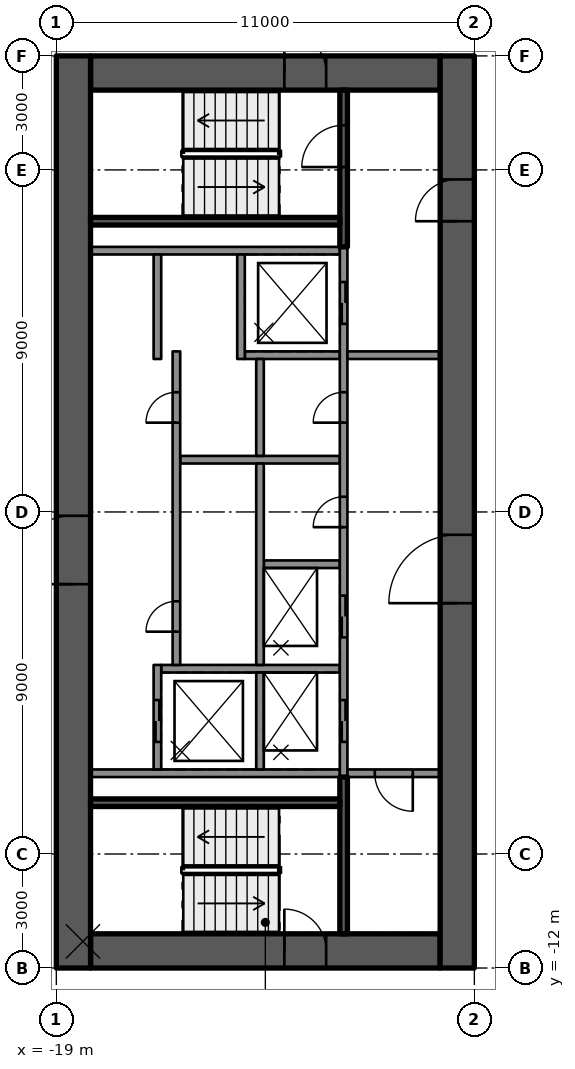
"""IFC4 building model, lengths in metres.
Left out: names, types, materials, properties, quantities, classifications, styles, units other than length and angle.
Written with IfcOpenShell. Run it as: python <this file> out.ifc"""

import sys

from ifc_helpers import new_model, si_unit, direction, frame, frame_2d, origin, place, context, subcontext, project, spatial, rectangle, extrude, element, fill, save


model = new_model("IFC4")
c1 = context("Model", 3, precision=1e-05, world=origin(), true_north=direction((0.0, 1.0)))
c2 = subcontext(c1, "Body", "Model", "MODEL_VIEW")
j1 = project(units=[si_unit("LENGTHUNIT", "METRE"), si_unit("PLANEANGLEUNIT", "RADIAN")], contexts=[c1])
p1 = place(None, origin())
s1 = spatial("IfcSite", under=j1, at=p1, CompositionType="ELEMENT")
p2 = place(p1, origin())
s2 = spatial("IfcBuilding", under=s1, at=p2, CompositionType="ELEMENT")
p3 = place(p2, frame((0.0, 0.0, 235.5)))
s3 = spatial("IfcBuildingStorey", under=s2, at=p3, CompositionType="ELEMENT", Elevation=235.5)
p4 = place(p3, frame((-18.1, 11.55, 0.0), z_axis=(0.0, 0.0, 1.0), x_axis=(1.0, 0.0, 0.0)))
e1 = element("IfcWall", 1, at=p4, inside=s3, PredefinedType="SHEAR", context=c2, shape_type="SweptSolid", body=[
    extrude(rectangle(XDim=9.2, YDim=0.9, at=frame_2d((4.6, 0.0))), origin(), (0.0, 0.0, 1.0), 3.5),
])
p5 = place(p4, frame((5.1, 0.0, 0.0)))
e2 = element("IfcOpeningElement", 2, at=p5, cuts=e1, PredefinedType="OPENING", context=c2, shape_type="SweptSolid", body=[
    extrude(rectangle(XDim=1.1, YDim=2.1, at=frame_2d((0.55, 1.05))), frame((0.0, 0.46, 0.0), z_axis=(0.0, -1.0, 0.0), x_axis=(1.0, 0.0, 0.0)), (0.0, 0.0, 1.0), 0.92),
])
p6 = place(p3, frame((-18.1, -11.55, 0.0), z_axis=(0.0, 0.0, 1.0), x_axis=(1.0, 0.0, 0.0)))
e3 = element("IfcWall", 3, at=p6, inside=s3, PredefinedType="SHEAR", context=c2, shape_type="SweptSolid", body=[
    extrude(rectangle(XDim=9.2, YDim=0.9, at=frame_2d((4.6, 0.0))), origin(), (0.0, 0.0, 1.0), 3.5),
])
p7 = place(p6, frame((5.1, 0.0, 0.0)))
e4 = element("IfcOpeningElement", 4, at=p7, cuts=e3, PredefinedType="OPENING", context=c2, shape_type="SweptSolid", body=[
    extrude(rectangle(XDim=1.1, YDim=2.1, at=frame_2d((0.55, 1.05))), frame((0.0, 0.46, 0.0), z_axis=(0.0, -1.0, 0.0), x_axis=(1.0, 0.0, 0.0)), (0.0, 0.0, 1.0), 0.92),
])
p8 = place(p3, frame((-18.55, -12.0, 0.0), z_axis=(0.0, 0.0, 1.0), x_axis=(0.0, 1.0, 0.0)))
e5 = element("IfcWall", 5, at=p8, inside=s3, PredefinedType="SHEAR", context=c2, shape_type="SweptSolid", body=[
    extrude(rectangle(XDim=24.0, YDim=0.9, at=frame_2d((12.0, 0.0))), origin(), (0.0, 0.0, 1.0), 3.5),
])
p9 = place(p8, frame((10.1, 0.0, 0.0)))
e6 = element("IfcOpeningElement", 6, at=p9, cuts=e5, PredefinedType="OPENING", context=c2, shape_type="SweptSolid", body=[
    extrude(rectangle(XDim=1.8, YDim=2.1, at=frame_2d((0.9, 1.05))), frame((0.0, 0.46, 0.0), z_axis=(0.0, -1.0, 0.0), x_axis=(1.0, 0.0, 0.0)), (0.0, 0.0, 1.0), 0.92),
])
p10 = place(p3, frame((-8.45, -12.0, 0.0), z_axis=(0.0, 0.0, 1.0), x_axis=(0.0, 1.0, 0.0)))
e7 = element("IfcWall", 7, at=p10, inside=s3, PredefinedType="SHEAR", context=c2, shape_type="SweptSolid", body=[
    extrude(rectangle(XDim=24.0, YDim=0.9, at=frame_2d((12.0, 0.0))), origin(), (0.0, 0.0, 1.0), 3.5),
])
p11 = place(p10, frame((9.6, 0.0, 0.0)))
e8 = element("IfcOpeningElement", 8, at=p11, cuts=e7, PredefinedType="OPENING", context=c2, shape_type="SweptSolid", body=[
    extrude(rectangle(XDim=1.8, YDim=2.1, at=frame_2d((0.9, 1.05))), frame((0.0, 0.46, 0.0), z_axis=(0.0, -1.0, 0.0), x_axis=(1.0, 0.0, 0.0)), (0.0, 0.0, 1.0), 0.92),
])
p12 = place(p10, frame((19.65, 0.0, 0.0)))
e9 = element("IfcOpeningElement", 9, at=p12, cuts=e7, PredefinedType="OPENING", context=c2, shape_type="SweptSolid", body=[
    extrude(rectangle(XDim=1.1, YDim=2.1, at=frame_2d((0.55, 1.05))), frame((0.0, 0.46, 0.0), z_axis=(0.0, -1.0, 0.0), x_axis=(1.0, 0.0, 0.0)), (0.0, 0.0, 1.0), 0.92),
])
for number, where, z_axis, x_axis in (
    (10, (-11.54, 6.875, 0.0), (0.0, 0.0, 1.0), (-1.0, 0.0, 0.0)),
    (11, (-11.54, -6.875, 0.0), (0.0, 0.0, 1.0), (-1.0, 0.0, 0.0)),
):
    element("IfcWall", number, at=place(p3, frame(where, z_axis=z_axis, x_axis=x_axis)), inside=s3, PredefinedType="SOLIDWALL", context=c2, shape_type="SweptSolid", body=[
        extrude(rectangle(XDim=6.56, YDim=0.2, at=frame_2d((3.28, 0.0))), origin(), (0.0, 0.0, 1.0), 3.09),
    ])
p13 = place(p3, frame((-11.54, -4.125, 0.0), z_axis=(0.0, 0.0, 1.0), x_axis=(-1.0, 0.0, 0.0)))
e12 = element("IfcWall", 12, at=p13, inside=s3, PredefinedType="SOLIDWALL", context=c2, shape_type="SweptSolid", body=[
    extrude(rectangle(XDim=4.7, YDim=0.2, at=frame_2d((2.35, 0.0))), origin(), (0.0, 0.0, 1.0), 3.09),
])
p14 = place(p3, frame((-11.54, -1.375, 0.0), z_axis=(0.0, 0.0, 1.0), x_axis=(-1.0, 0.0, 0.0)))
e13 = element("IfcWall", 13, at=p14, inside=s3, PredefinedType="SOLIDWALL", context=c2, shape_type="SweptSolid", body=[
    extrude(rectangle(XDim=2.0, YDim=0.2, at=frame_2d((1.0, 0.0))), origin(), (0.0, 0.0, 1.0), 3.09),
])
p15 = place(p3, frame((-11.54, 1.375, 0.0), z_axis=(0.0, 0.0, 1.0), x_axis=(-1.0, 0.0, 0.0)))
e14 = element("IfcWall", 14, at=p15, inside=s3, PredefinedType="SOLIDWALL", context=c2, shape_type="SweptSolid", body=[
    extrude(rectangle(XDim=4.2, YDim=0.2, at=frame_2d((2.1, 0.0))), origin(), (0.0, 0.0, 1.0), 3.09),
])
p16 = place(p3, frame((-11.54, 4.125, 0.0), z_axis=(0.0, 0.0, 1.0), x_axis=(-1.0, 0.0, 0.0)))
e15 = element("IfcWall", 15, at=p16, inside=s3, PredefinedType="SOLIDWALL", context=c2, shape_type="SweptSolid", body=[
    extrude(rectangle(XDim=2.5, YDim=0.2, at=frame_2d((1.25, 0.0))), origin(), (0.0, 0.0, 1.0), 3.09),
])
p17 = place(p3, frame((-11.44, -6.975, 0.0), z_axis=(0.0, 0.0, 1.0), x_axis=(0.0, 1.0, 0.0)))
e16 = element("IfcWall", 16, at=p17, inside=s3, PredefinedType="SOLIDWALL", context=c2, shape_type="SweptSolid", body=[
    extrude(rectangle(XDim=13.95, YDim=0.2, at=frame_2d((6.975, 0.0))), origin(), (0.0, 0.0, 1.0), 3.09),
])
p18 = place(p17, frame((0.925, 0.0, 0.0)))
e17 = element("IfcOpeningElement", 17, at=p18, cuts=e16, PredefinedType="OPENING", context=c2, shape_type="SweptSolid", body=[
    extrude(rectangle(XDim=1.1, YDim=2.1, at=frame_2d((0.55, 1.05))), frame((0.0, 0.11, 0.0), z_axis=(0.0, -1.0, 0.0), x_axis=(1.0, 0.0, 0.0)), (0.0, 0.0, 1.0), 0.22),
])
p19 = place(p17, frame((3.675, 0.0, 0.0)))
e18 = element("IfcOpeningElement", 18, at=p19, cuts=e16, PredefinedType="OPENING", context=c2, shape_type="SweptSolid", body=[
    extrude(rectangle(XDim=1.1, YDim=2.1, at=frame_2d((0.55, 1.05))), frame((0.0, 0.11, 0.0), z_axis=(0.0, -1.0, 0.0), x_axis=(1.0, 0.0, 0.0)), (0.0, 0.0, 1.0), 0.22),
])
p20 = place(p17, frame((11.925, 0.0, 0.0)))
e19 = element("IfcOpeningElement", 19, at=p20, cuts=e16, PredefinedType="OPENING", context=c2, shape_type="SweptSolid", body=[
    extrude(rectangle(XDim=1.1, YDim=2.1, at=frame_2d((0.55, 1.05))), frame((0.0, 0.11, 0.0), z_axis=(0.0, -1.0, 0.0), x_axis=(1.0, 0.0, 0.0)), (0.0, 0.0, 1.0), 0.22),
])
p21 = place(p17, frame((6.575, 0.0, 0.0)))
e20 = element("IfcOpeningElement", 20, at=p21, cuts=e16, PredefinedType="OPENING", context=c2, shape_type="SweptSolid", body=[
    extrude(rectangle(XDim=0.8, YDim=2.1, at=frame_2d((0.4, 1.05))), frame((0.0, 0.11, 0.0), z_axis=(0.0, -1.0, 0.0), x_axis=(1.0, 0.0, 0.0)), (0.0, 0.0, 1.0), 0.22),
])
p22 = place(p17, frame((9.325, 0.0, 0.0)))
e21 = element("IfcOpeningElement", 21, at=p22, cuts=e16, PredefinedType="OPENING", context=c2, shape_type="SweptSolid", body=[
    extrude(rectangle(XDim=0.8, YDim=2.1, at=frame_2d((0.4, 1.05))), frame((0.0, 0.11, 0.0), z_axis=(0.0, -1.0, 0.0), x_axis=(1.0, 0.0, 0.0)), (0.0, 0.0, 1.0), 0.22),
])
p23 = place(p3, frame((-13.64, -6.775, 0.0), z_axis=(0.0, 0.0, 1.0), x_axis=(0.0, 1.0, 0.0)))
e22 = element("IfcWall", 22, at=p23, inside=s3, PredefinedType="SOLIDWALL", context=c2, shape_type="SweptSolid", body=[
    extrude(rectangle(XDim=2.55, YDim=0.2, at=frame_2d((1.275, 0.0))), origin(), (0.0, 0.0, 1.0), 3.09),
])
p24 = place(p3, frame((-13.64, -4.025, 0.0), z_axis=(0.0, 0.0, 1.0), x_axis=(0.0, 1.0, 0.0)))
e23 = element("IfcWall", 23, at=p24, inside=s3, PredefinedType="SOLIDWALL", context=c2, shape_type="SweptSolid", body=[
    extrude(rectangle(XDim=5.3, YDim=0.2, at=frame_2d((2.65, 0.0))), origin(), (0.0, 0.0, 1.0), 3.09),
])
p25 = place(p3, frame((-13.64, 1.475, 0.0), z_axis=(0.0, 0.0, 1.0), x_axis=(0.0, 1.0, 0.0)))
e24 = element("IfcWall", 24, at=p25, inside=s3, PredefinedType="SOLIDWALL", context=c2, shape_type="SweptSolid", body=[
    extrude(rectangle(XDim=2.55, YDim=0.2, at=frame_2d((1.275, 0.0))), origin(), (0.0, 0.0, 1.0), 3.09),
])
p26 = place(p3, frame((-14.14, 4.025, 0.0), z_axis=(0.0, 0.0, 1.0), x_axis=(0.0, 1.0, 0.0)))
e25 = element("IfcWall", 25, at=p26, inside=s3, PredefinedType="SOLIDWALL", context=c2, shape_type="SweptSolid", body=[
    extrude(rectangle(XDim=2.75, YDim=0.2, at=frame_2d((1.375, 0.0))), origin(), (0.0, 0.0, 1.0), 3.09),
])
p27 = place(p3, frame((-16.34, -6.775, 0.0), z_axis=(0.0, 0.0, 1.0), x_axis=(0.0, 1.0, 0.0)))
e26 = element("IfcWall", 26, at=p27, inside=s3, PredefinedType="SOLIDWALL", context=c2, shape_type="SweptSolid", body=[
    extrude(rectangle(XDim=2.75, YDim=0.2, at=frame_2d((1.375, 0.0))), origin(), (0.0, 0.0, 1.0), 3.09),
])
p28 = place(p27, frame((0.725, 0.0, 0.0)))
e27 = element("IfcOpeningElement", 27, at=p28, cuts=e26, PredefinedType="OPENING", context=c2, shape_type="SweptSolid", body=[
    extrude(rectangle(XDim=1.1, YDim=2.1, at=frame_2d((0.55, 1.05))), frame((0.0, 0.11, 0.0), z_axis=(0.0, -1.0, 0.0), x_axis=(1.0, 0.0, 0.0)), (0.0, 0.0, 1.0), 0.22),
])
p29 = place(p3, frame((-15.84, -4.025, 0.0), z_axis=(0.0, 0.0, 1.0), x_axis=(0.0, 1.0, 0.0)))
e28 = element("IfcWall", 28, at=p29, inside=s3, PredefinedType="SOLIDWALL", context=c2, shape_type="SweptSolid", body=[
    extrude(rectangle(XDim=8.25, YDim=0.2, at=frame_2d((4.125, 0.0))), origin(), (0.0, 0.0, 1.0), 3.09),
])
p30 = place(p29, frame((0.875, 0.0, 0.0)))
e29 = element("IfcOpeningElement", 29, at=p30, cuts=e28, PredefinedType="OPENING", context=c2, shape_type="SweptSolid", body=[
    extrude(rectangle(XDim=0.8, YDim=2.1, at=frame_2d((0.4, 1.05))), frame((0.0, 0.11, 0.0), z_axis=(0.0, -1.0, 0.0), x_axis=(1.0, 0.0, 0.0)), (0.0, 0.0, 1.0), 0.22),
])
p31 = place(p29, frame((6.375, 0.0, 0.0)))
e30 = element("IfcOpeningElement", 30, at=p31, cuts=e28, PredefinedType="OPENING", context=c2, shape_type="SweptSolid", body=[
    extrude(rectangle(XDim=0.8, YDim=2.1, at=frame_2d((0.4, 1.05))), frame((0.0, 0.11, 0.0), z_axis=(0.0, -1.0, 0.0), x_axis=(1.0, 0.0, 0.0)), (0.0, 0.0, 1.0), 0.22),
])
p32 = place(p3, frame((-16.34, 4.025, 0.0), z_axis=(0.0, 0.0, 1.0), x_axis=(0.0, 1.0, 0.0)))
e31 = element("IfcWall", 31, at=p32, inside=s3, PredefinedType="SOLIDWALL", context=c2, shape_type="SweptSolid", body=[
    extrude(rectangle(XDim=2.75, YDim=0.2, at=frame_2d((1.375, 0.0))), origin(), (0.0, 0.0, 1.0), 3.09),
])
p33 = place(p3, frame((-11.44, 6.975, 0.0), z_axis=(0.0, 0.0, 1.0), x_axis=(0.0, 1.0, 0.0)))
e32 = element("IfcWall", 32, at=p33, inside=s3, PredefinedType="SOLIDWALL", context=c2, shape_type="SweptSolid", body=[
    extrude(rectangle(XDim=4.125, YDim=0.2, at=frame_2d((2.062, 0.0))), origin(), (0.0, 0.0, 1.0), 3.09),
])
p34 = place(p33, frame((2.1, 0.0, 0.0)))
e33 = element("IfcOpeningElement", 33, at=p34, cuts=e32, PredefinedType="OPENING", context=c2, shape_type="SweptSolid", body=[
    extrude(rectangle(XDim=1.1, YDim=2.1, at=frame_2d((0.55, 1.05))), frame((0.0, 0.11, 0.0), z_axis=(0.0, -1.0, 0.0), x_axis=(1.0, 0.0, 0.0)), (0.0, 0.0, 1.0), 0.22),
])
p35 = place(p3, frame((-11.54, 7.65, 0.0), z_axis=(0.0, 0.0, 1.0), x_axis=(-1.0, 0.0, 0.0)))
e34 = element("IfcWall", 34, at=p35, inside=s3, PredefinedType="SOLIDWALL", context=c2, shape_type="SweptSolid", body=[
    extrude(rectangle(XDim=6.56, YDim=0.2, at=frame_2d((3.28, 0.0))), origin(), (0.0, 0.0, 1.0), 3.09),
])
p36 = place(p3, frame((-11.44, -11.1, 0.0), z_axis=(0.0, 0.0, 1.0), x_axis=(0.0, 1.0, 0.0)))
e35 = element("IfcWall", 35, at=p36, inside=s3, PredefinedType="SOLIDWALL", context=c2, shape_type="SweptSolid", body=[
    extrude(rectangle(XDim=4.125, YDim=0.2, at=frame_2d((2.062, 0.0))), origin(), (0.0, 0.0, 1.0), 3.09),
])
p37 = place(p3, frame((-11.54, -7.65, 0.0), z_axis=(0.0, 0.0, 1.0), x_axis=(-1.0, 0.0, 0.0)))
e36 = element("IfcWall", 36, at=p37, inside=s3, PredefinedType="SOLIDWALL", context=c2, shape_type="SweptSolid", body=[
    extrude(rectangle(XDim=6.56, YDim=0.2, at=frame_2d((3.28, 0.0))), origin(), (0.0, 0.0, 1.0), 3.09),
])
p38 = place(p3, frame((-8.9, 4.125, 0.0), z_axis=(0.0, 0.0, 1.0), x_axis=(-1.0, 0.0, 0.0)))
e37 = element("IfcWall", 37, at=p38, inside=s3, PredefinedType="PARTITIONING", context=c2, shape_type="SweptSolid", body=[
    extrude(rectangle(XDim=2.44, YDim=0.2, at=frame_2d((1.22, 0.0))), origin(), (0.0, 0.0, 1.0), 3.09),
])
p39 = place(p3, frame((-8.9, -6.875, 0.0), z_axis=(0.0, 0.0, 1.0), x_axis=(-1.0, 0.0, 0.0)))
e38 = element("IfcWall", 38, at=p39, inside=s3, PredefinedType="PARTITIONING", context=c2, shape_type="SweptSolid", body=[
    extrude(rectangle(XDim=2.44, YDim=0.2, at=frame_2d((1.22, 0.0))), origin(), (0.0, 0.0, 1.0), 3.09),
])
p40 = place(p39, frame((0.72, 0.0, 0.0)))
e39 = element("IfcOpeningElement", 39, at=p40, cuts=e38, PredefinedType="OPENING", context=c2, shape_type="SweptSolid", body=[
    extrude(rectangle(XDim=1.0, YDim=2.1, at=frame_2d((0.5, 1.05))), frame((0.0, 0.11, 0.0), z_axis=(0.0, -1.0, 0.0), x_axis=(1.0, 0.0, 0.0)), (0.0, 0.0, 1.0), 0.22),
])
p41 = place(p18, origin())
e40 = element("IfcDoor", 40, at=p41, inside=s3, OperationType="DOUBLE_DOOR_SLIDING", PredefinedType="DOOR", context=c2, shape_type="SweptSolid", body=[
    extrude(rectangle(XDim=1.1, YDim=2.1, at=frame_2d((0.55, 1.05))), frame((0.0, 0.025, 0.0), z_axis=(0.0, -1.0, 0.0), x_axis=(1.0, 0.0, 0.0)), (0.0, 0.0, 1.0), 0.05),
])
fill(e17, e40)
p42 = place(p28, origin())
e41 = element("IfcDoor", 41, at=p42, inside=s3, OperationType="DOUBLE_DOOR_SLIDING", PredefinedType="DOOR", context=c2, shape_type="SweptSolid", body=[
    extrude(rectangle(XDim=1.1, YDim=2.1, at=frame_2d((0.55, 1.05))), frame((0.0, 0.025, 0.0), z_axis=(0.0, -1.0, 0.0), x_axis=(1.0, 0.0, 0.0)), (0.0, 0.0, 1.0), 0.05),
])
fill(e27, e41)
p43 = place(p19, origin())
e42 = element("IfcDoor", 42, at=p43, inside=s3, OperationType="DOUBLE_DOOR_SLIDING", PredefinedType="DOOR", context=c2, shape_type="SweptSolid", body=[
    extrude(rectangle(XDim=1.1, YDim=2.1, at=frame_2d((0.55, 1.05))), frame((0.0, 0.025, 0.0), z_axis=(0.0, -1.0, 0.0), x_axis=(1.0, 0.0, 0.0)), (0.0, 0.0, 1.0), 0.05),
])
fill(e18, e42)
p44 = place(p20, origin())
e43 = element("IfcDoor", 43, at=p44, inside=s3, OperationType="DOUBLE_DOOR_SLIDING", PredefinedType="DOOR", context=c2, shape_type="SweptSolid", body=[
    extrude(rectangle(XDim=1.1, YDim=2.1, at=frame_2d((0.55, 1.05))), frame((0.0, 0.025, 0.0), z_axis=(0.0, -1.0, 0.0), x_axis=(1.0, 0.0, 0.0)), (0.0, 0.0, 1.0), 0.05),
])
fill(e19, e43)
p45 = place(p30, origin())
e44 = element("IfcDoor", 44, at=p45, inside=s3, OperationType="SINGLE_SWING_LEFT", PredefinedType="DOOR", context=c2, shape_type="SweptSolid", body=[
    extrude(rectangle(XDim=0.8, YDim=2.1, at=frame_2d((0.4, 1.05))), frame((0.0, 0.025, 0.0), z_axis=(0.0, -1.0, 0.0), x_axis=(1.0, 0.0, 0.0)), (0.0, 0.0, 1.0), 0.05),
])
fill(e29, e44)
p46 = place(p21, origin())
e45 = element("IfcDoor", 45, at=p46, inside=s3, OperationType="SINGLE_SWING_LEFT", PredefinedType="DOOR", context=c2, shape_type="SweptSolid", body=[
    extrude(rectangle(XDim=0.8, YDim=2.1, at=frame_2d((0.4, 1.05))), frame((0.0, 0.025, 0.0), z_axis=(0.0, -1.0, 0.0), x_axis=(1.0, 0.0, 0.0)), (0.0, 0.0, 1.0), 0.05),
])
fill(e20, e45)
p47 = place(p22, origin())
e46 = element("IfcDoor", 46, at=p47, inside=s3, OperationType="SINGLE_SWING_LEFT", PredefinedType="DOOR", context=c2, shape_type="SweptSolid", body=[
    extrude(rectangle(XDim=0.8, YDim=2.1, at=frame_2d((0.4, 1.05))), frame((0.0, 0.025, 0.0), z_axis=(0.0, -1.0, 0.0), x_axis=(1.0, 0.0, 0.0)), (0.0, 0.0, 1.0), 0.05),
])
fill(e21, e46)
p48 = place(p31, origin())
e47 = element("IfcDoor", 47, at=p48, inside=s3, OperationType="SINGLE_SWING_LEFT", PredefinedType="DOOR", context=c2, shape_type="SweptSolid", body=[
    extrude(rectangle(XDim=0.8, YDim=2.1, at=frame_2d((0.4, 1.05))), frame((0.0, 0.025, 0.0), z_axis=(0.0, -1.0, 0.0), x_axis=(1.0, 0.0, 0.0)), (0.0, 0.0, 1.0), 0.05),
])
fill(e30, e47)
p49 = place(p11, origin())
e48 = element("IfcDoor", 48, at=p49, inside=s3, OperationType="SINGLE_SWING_LEFT", PredefinedType="DOOR", context=c2, shape_type="SweptSolid", body=[
    extrude(rectangle(XDim=1.8, YDim=2.1, at=frame_2d((0.9, 1.05))), frame((0.0, 0.025, 0.0), z_axis=(0.0, -1.0, 0.0), x_axis=(1.0, 0.0, 0.0)), (0.0, 0.0, 1.0), 0.05),
])
fill(e8, e48)
p50 = place(p9, origin())
e49 = element("IfcDoor", 49, at=p50, inside=s3, OperationType="SINGLE_SWING_LEFT", PredefinedType="DOOR", context=c2, shape_type="SweptSolid", body=[
    extrude(rectangle(XDim=1.8, YDim=2.1, at=frame_2d((0.9, 1.05))), frame((0.0, 0.025, 0.0), z_axis=(0.0, -1.0, 0.0), x_axis=(1.0, 0.0, 0.0)), (0.0, 0.0, 1.0), 0.05),
])
fill(e6, e49)
p51 = place(p12, origin())
e50 = element("IfcDoor", 50, at=p51, inside=s3, OperationType="SINGLE_SWING_RIGHT", PredefinedType="DOOR", context=c2, shape_type="SweptSolid", body=[
    extrude(rectangle(XDim=1.1, YDim=2.1, at=frame_2d((0.55, 1.05))), frame((0.0, 0.025, 0.0), z_axis=(0.0, -1.0, 0.0), x_axis=(1.0, 0.0, 0.0)), (0.0, 0.0, 1.0), 0.05),
])
fill(e9, e50)
p52 = place(p5, origin())
e51 = element("IfcDoor", 51, at=p52, inside=s3, OperationType="SINGLE_SWING_RIGHT", PredefinedType="DOOR", context=c2, shape_type="SweptSolid", body=[
    extrude(rectangle(XDim=1.1, YDim=2.1, at=frame_2d((0.55, 1.05))), frame((0.0, 0.025, 0.0), z_axis=(0.0, -1.0, 0.0), x_axis=(1.0, 0.0, 0.0)), (0.0, 0.0, 1.0), 0.05),
])
fill(e2, e51)
p53 = place(p7, origin())
e52 = element("IfcDoor", 52, at=p53, inside=s3, OperationType="SINGLE_SWING_RIGHT", PredefinedType="DOOR", context=c2, shape_type="SweptSolid", body=[
    extrude(rectangle(XDim=1.1, YDim=2.1, at=frame_2d((0.55, 1.05))), frame((0.0, 0.025, 0.0), z_axis=(0.0, -1.0, 0.0), x_axis=(1.0, 0.0, 0.0)), (0.0, 0.0, 1.0), 0.05),
])
fill(e4, e52)
p54 = place(p34, origin())
e53 = element("IfcDoor", 53, at=p54, inside=s3, OperationType="SINGLE_SWING_RIGHT", PredefinedType="DOOR", context=c2, shape_type="SweptSolid", body=[
    extrude(rectangle(XDim=1.1, YDim=2.1, at=frame_2d((0.55, 1.05))), frame((0.0, 0.025, 0.0), z_axis=(0.0, -1.0, 0.0), x_axis=(1.0, 0.0, 0.0)), (0.0, 0.0, 1.0), 0.05),
])
fill(e33, e53)
p55 = place(p40, origin())
e54 = element("IfcDoor", 54, at=p55, inside=s3, OperationType="SINGLE_SWING_RIGHT", PredefinedType="DOOR", context=c2, shape_type="SweptSolid", body=[
    extrude(rectangle(XDim=1.0, YDim=2.1, at=frame_2d((0.5, 1.05))), frame((0.0, 0.025, 0.0), z_axis=(0.0, -1.0, 0.0), x_axis=(1.0, 0.0, 0.0)), (0.0, 0.0, 1.0), 0.05),
])
fill(e39, e54)
save(model, sys.argv[1])
